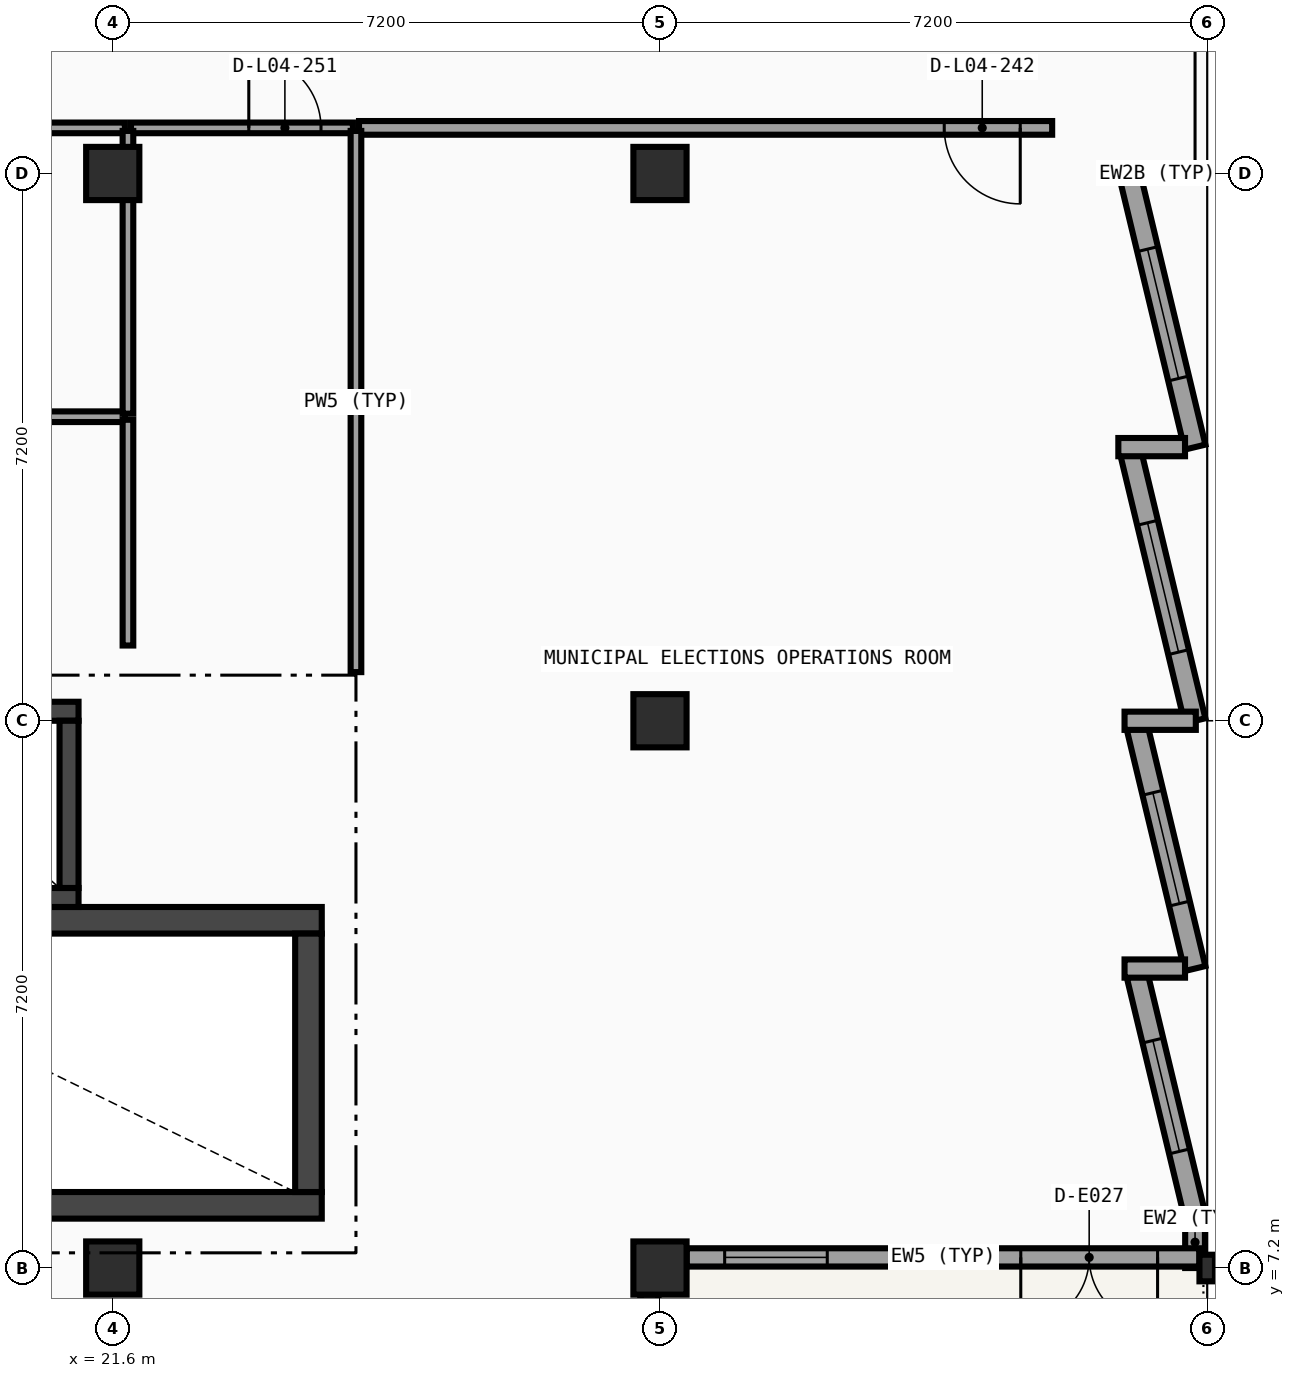
"""IFC4 building model, lengths in metres.
Left out: names, types, materials, properties, quantities, classifications, styles, units other than length and angle.
Written with IfcOpenShell. Run it as: python <this file> out.ifc"""

import sys

from ifc_helpers import new_model, si_unit, direction, frame, frame_2d, origin, origin_2d, place, context, subcontext, project, spatial, rectangle, i_section, extrude, element, fill, save


model = new_model("IFC4")
c1 = context("Model", 3, precision=1e-05, world=origin(), true_north=direction((0.0, 1.0)))
c2 = subcontext(c1, "Body", "Model", "MODEL_VIEW")
j1 = project(units=[si_unit("LENGTHUNIT", "METRE"), si_unit("PLANEANGLEUNIT", "RADIAN")], contexts=[c1])
p1 = place(None, origin())
s1 = spatial("IfcSite", under=j1, at=p1, CompositionType="ELEMENT")
p2 = place(p1, origin())
s2 = spatial("IfcBuilding", under=s1, at=p2, CompositionType="ELEMENT")
p3 = place(p2, frame((0.0, 0.0, 18.9)))
s3 = spatial("IfcBuildingStorey", under=s2, at=p3, CompositionType="ELEMENT", Elevation=18.9)
for number, where, z_axis, x_axis in (
    (1, (21.6, 7.2, 0.0), (0.0, 0.0, 1.0), (1.0, 0.0, 0.0)),
    (2, (21.6, 21.6, 0.0), (0.0, 0.0, 1.0), (1.0, 0.0, 0.0)),
    (3, (28.8, 7.2, 0.0), (0.0, 0.0, 1.0), (1.0, 0.0, 0.0)),
    (4, (28.8, 14.4, 0.0), (0.0, 0.0, 1.0), (1.0, 0.0, 0.0)),
    (5, (28.8, 21.6, 0.0), (0.0, 0.0, 1.0), (1.0, 0.0, 0.0)),
):
    element("IfcColumn", number, at=place(p3, frame(where, z_axis=z_axis, x_axis=x_axis)), inside=s3, PredefinedType="COLUMN", context=c2, shape_type="SweptSolid", body=[
        extrude(rectangle(XDim=0.7, YDim=0.7, at=origin_2d()), origin(), (0.0, 0.0, 1.0), 4.05),
    ])
p4 = place(p3, frame((36.0, 7.2, 0.0), z_axis=(0.0, 0.0, 1.0), x_axis=(1.0, 0.0, 0.0)))
e6 = element("IfcColumn", 6, at=p4, inside=s3, PredefinedType="COLUMN", context=c2, shape_type="SweptSolid", body=[
    extrude(i_section(OverallWidth=0.204, OverallDepth=0.35, WebThickness=0.009, FlangeThickness=0.015, FilletRadius=0.015, at=origin_2d()), origin(), (0.0, 0.0, 1.0), 4.05),
])
p5 = place(p3, frame((34.998, 21.508, 0.0), z_axis=(0.0, 0.0, 1.0), x_axis=(0.233495818898, -0.972357805829, 0.0)))
e7 = element("IfcWall", 7, at=p5, inside=s3, PredefinedType="SOLIDWALL", context=c2, shape_type="SweptSolid", body=[
    extrude(rectangle(XDim=3.607, YDim=0.28, at=frame_2d((1.804, 0.0))), origin(), (0.0, 0.0, 1.0), 3.8),
])
p6 = place(p5, frame((0.929, 0.0, 0.8)))
e8 = element("IfcOpeningElement", 8, at=p6, cuts=e7, PredefinedType="OPENING", context=c2, shape_type="SweptSolid", body=[
    extrude(rectangle(XDim=1.75, YDim=2.05, at=frame_2d((0.875, 1.025))), frame((0.0, 0.15, 0.0), z_axis=(0.0, -1.0, 0.0), x_axis=(1.0, 0.0, 0.0)), (0.0, 0.0, 1.0), 0.3),
])
p7 = place(p3, frame((34.831, 21.6, 0.0), z_axis=(0.0, 0.0, 1.0), x_axis=(1.0, 0.0, 0.0)))
e9 = element("IfcWall", 9, at=p7, inside=s3, PredefinedType="SOLIDWALL", context=c2, shape_type="SweptSolid", body=[
    extrude(rectangle(XDim=1.019, YDim=0.24, at=frame_2d((0.51, 0.0))), origin(), (0.0, 0.0, 1.0), 3.8),
])
p8 = place(p3, frame((34.998, 17.908, 0.0), z_axis=(0.0, 0.0, 1.0), x_axis=(0.233480453725, -0.972361495396, 0.0)))
e10 = element("IfcWall", 10, at=p8, inside=s3, PredefinedType="SOLIDWALL", context=c2, shape_type="SweptSolid", body=[
    extrude(rectangle(XDim=3.607, YDim=0.28, at=frame_2d((1.804, 0.0))), origin(), (0.0, 0.0, 1.0), 3.8),
])
p9 = place(p8, frame((0.929, 0.0, 0.8)))
e11 = element("IfcOpeningElement", 11, at=p9, cuts=e10, PredefinedType="OPENING", context=c2, shape_type="SweptSolid", body=[
    extrude(rectangle(XDim=1.75, YDim=2.05, at=frame_2d((0.875, 1.025))), frame((0.0, 0.15, 0.0), z_axis=(0.0, -1.0, 0.0), x_axis=(1.0, 0.0, 0.0)), (0.0, 0.0, 1.0), 0.3),
])
p10 = place(p3, frame((34.831, 18.0, 0.0), z_axis=(0.0, 0.0, 1.0), x_axis=(1.0, 0.0, 0.0)))
e12 = element("IfcWall", 12, at=p10, inside=s3, PredefinedType="SOLIDWALL", context=c2, shape_type="SweptSolid", body=[
    extrude(rectangle(XDim=0.877, YDim=0.24, at=frame_2d((0.438, 0.0))), origin(), (0.0, 0.0, 1.0), 3.8),
])
p11 = place(p3, frame((35.84, 7.88, 0.0), z_axis=(0.0, 0.0, 1.0), x_axis=(0.0, -1.0, 0.0)))
e13 = element("IfcWall", 13, at=p11, inside=s3, PredefinedType="SOLIDWALL", context=c2, shape_type="SweptSolid", body=[
    extrude(rectangle(XDim=0.68, YDim=0.26, at=frame_2d((0.34, 0.0))), origin(), (0.0, 0.0, 1.0), 3.216),
])
p12 = place(p3, frame((35.08, 14.308, 0.0), z_axis=(0.0, 0.0, 1.0), x_axis=(0.233443812137, -0.972370292931, 0.0)))
e14 = element("IfcWall", 14, at=p12, inside=s3, PredefinedType="SOLIDWALL", context=c2, shape_type="SweptSolid", body=[
    extrude(rectangle(XDim=3.258, YDim=0.28, at=frame_2d((1.629, 0.0))), origin(), (0.0, 0.0, 1.0), 3.8),
])
p13 = place(p12, frame((0.879, 0.0, 0.8)))
e15 = element("IfcOpeningElement", 15, at=p13, cuts=e14, PredefinedType="OPENING", context=c2, shape_type="SweptSolid", body=[
    extrude(rectangle(XDim=1.5, YDim=1.7, at=frame_2d((0.75, 0.85))), frame((0.0, 0.15, 0.0), z_axis=(0.0, -1.0, 0.0), x_axis=(1.0, 0.0, 0.0)), (0.0, 0.0, 1.0), 0.3),
])
p14 = place(p3, frame((34.912, 14.4, 0.0), z_axis=(0.0, 0.0, 1.0), x_axis=(1.0, 0.0, 0.0)))
e16 = element("IfcWall", 16, at=p14, inside=s3, PredefinedType="SOLIDWALL", context=c2, shape_type="SweptSolid", body=[
    extrude(rectangle(XDim=0.938, YDim=0.24, at=frame_2d((0.469, 0.0))), origin(), (0.0, 0.0, 1.0), 3.8),
])
p15 = place(p3, frame((35.08, 11.048, 0.0), z_axis=(0.0, 0.0, 1.0), x_axis=(0.233443812137, -0.972370292931, 0.0)))
e17 = element("IfcWall", 17, at=p15, inside=s3, PredefinedType="SOLIDWALL", context=c2, shape_type="SweptSolid", body=[
    extrude(rectangle(XDim=3.258, YDim=0.28, at=frame_2d((1.629, 0.0))), origin(), (0.0, 0.0, 1.0), 3.8),
])
p16 = place(p15, frame((0.879, 0.0, 0.8)))
e18 = element("IfcOpeningElement", 18, at=p16, cuts=e17, PredefinedType="OPENING", context=c2, shape_type="SweptSolid", body=[
    extrude(rectangle(XDim=1.5, YDim=1.7, at=frame_2d((0.75, 0.85))), frame((0.0, 0.15, 0.0), z_axis=(0.0, -1.0, 0.0), x_axis=(1.0, 0.0, 0.0)), (0.0, 0.0, 1.0), 0.3),
])
p17 = place(p3, frame((34.912, 11.14, 0.0), z_axis=(0.0, 0.0, 1.0), x_axis=(1.0, 0.0, 0.0)))
e19 = element("IfcWall", 19, at=p17, inside=s3, PredefinedType="SOLIDWALL", context=c2, shape_type="SweptSolid", body=[
    extrude(rectangle(XDim=0.796, YDim=0.24, at=frame_2d((0.398, 0.0))), origin(), (0.0, 0.0, 1.0), 3.8),
])
p18 = place(p3, frame((35.897, 7.34, 0.0), z_axis=(0.0, 0.0, 1.0), x_axis=(-1.0, 0.0, 0.0)))
e20 = element("IfcWall", 20, at=p18, inside=s3, PredefinedType="SOLIDWALL", context=c2, shape_type="SweptSolid", body=[
    extrude(rectangle(XDim=6.746, YDim=0.24, at=frame_2d((3.373, 0.0))), origin(), (0.0, 0.0, 1.0), 3.216),
])
p19 = place(p18, frame((0.55, 0.0, 0.0)))
e21 = element("IfcOpeningElement", 21, at=p19, cuts=e20, PredefinedType="OPENING", context=c2, shape_type="SweptSolid", body=[
    extrude(rectangle(XDim=1.8, YDim=2.15, at=frame_2d((0.9, 1.075))), frame((0.0, 0.13, 0.0), z_axis=(0.0, -1.0, 0.0), x_axis=(1.0, 0.0, 0.0)), (0.0, 0.0, 1.0), 0.26),
])
p20 = place(p18, frame((4.896, 0.0, 0.85)))
e22 = element("IfcOpeningElement", 22, at=p20, cuts=e20, PredefinedType="OPENING", context=c2, shape_type="SweptSolid", body=[
    extrude(rectangle(XDim=1.35, YDim=1.85, at=frame_2d((0.675, 0.925))), frame((0.0, 0.13, 0.0), z_axis=(0.0, -1.0, 0.0), x_axis=(1.0, 0.0, 0.0)), (0.0, 0.0, 1.0), 0.26),
])
p21 = place(p3, frame((28.66, 6.849, 0.0), z_axis=(0.0, 0.0, 1.0), x_axis=(0.0, -1.0, 0.0)))
e23 = element("IfcWall", 23, at=p21, inside=s3, PredefinedType="SOLIDWALL", context=c2, shape_type="SweptSolid", body=[
    extrude(rectangle(XDim=6.498, YDim=0.24, at=frame_2d((3.249, 0.0))), origin(), (0.0, 0.0, 1.0), 3.216),
])
p22 = place(p21, frame((0.55, 0.0, 0.0)))
e24 = element("IfcOpeningElement", 24, at=p22, cuts=e23, PredefinedType="OPENING", context=c2, shape_type="SweptSolid", body=[
    extrude(rectangle(XDim=1.8, YDim=2.15, at=frame_2d((0.9, 1.075))), frame((0.0, 0.13, 0.0), z_axis=(0.0, -1.0, 0.0), x_axis=(1.0, 0.0, 0.0)), (0.0, 0.0, 1.0), 0.26),
])
p23 = place(p21, frame((4.648, 0.0, 0.85)))
e25 = element("IfcOpeningElement", 25, at=p23, cuts=e23, PredefinedType="OPENING", context=c2, shape_type="SweptSolid", body=[
    extrude(rectangle(XDim=1.35, YDim=1.85, at=frame_2d((0.675, 0.925))), frame((0.0, 0.13, 0.0), z_axis=(0.0, -1.0, 0.0), x_axis=(1.0, 0.0, 0.0)), (0.0, 0.0, 1.0), 0.26),
])
for number, where, z_axis, x_axis in (
    (26, (15.05, 8.025, 0.0), (0.0, 0.0, 1.0), (1.0, 0.0, 0.0)),
    (27, (24.35, 11.775, 0.0), (0.0, 0.0, 1.0), (-1.0, 0.0, 0.0)),
):
    element("IfcWall", number, at=place(p3, frame(where, z_axis=z_axis, x_axis=x_axis)), inside=s3, PredefinedType="SHEAR", context=c2, shape_type="SweptSolid", body=[
        extrude(rectangle(XDim=9.3, YDim=0.35, at=frame_2d((4.65, 0.0))), origin(), (0.0, 0.0, 1.0), 3.8),
    ])
p24 = place(p3, frame((24.175, 8.2, 0.0), z_axis=(0.0, 0.0, 1.0), x_axis=(0.0, 1.0, 0.0)))
e28 = element("IfcWall", 28, at=p24, inside=s3, PredefinedType="SHEAR", context=c2, shape_type="SweptSolid", body=[
    extrude(rectangle(XDim=3.4, YDim=0.35, at=frame_2d((1.7, 0.0))), origin(), (0.0, 0.0, 1.0), 3.8),
])
for number, where, z_axis, x_axis in (
    (29, (18.15, 12.075, 0.0), (0.0, 0.0, 1.0), (1.0, 0.0, 0.0)),
    (30, (21.15, 14.525, 0.0), (0.0, 0.0, 1.0), (-1.0, 0.0, 0.0)),
):
    element("IfcWall", number, at=place(p3, frame(where, z_axis=z_axis, x_axis=x_axis)), inside=s3, PredefinedType="SHEAR", context=c2, shape_type="SweptSolid", body=[
        extrude(rectangle(XDim=3.0, YDim=0.25, at=frame_2d((1.5, 0.0))), origin(), (0.0, 0.0, 1.0), 3.8),
    ])
p25 = place(p3, frame((21.025, 12.2, 0.0), z_axis=(0.0, 0.0, 1.0), x_axis=(0.0, 1.0, 0.0)))
e31 = element("IfcWall", 31, at=p25, inside=s3, PredefinedType="SHEAR", context=c2, shape_type="SweptSolid", body=[
    extrude(rectangle(XDim=2.2, YDim=0.25, at=frame_2d((1.1, 0.0))), origin(), (0.0, 0.0, 1.0), 3.8),
])
p26 = place(p3, frame((24.84, 22.2, 0.0), z_axis=(0.0, 0.0, 1.0), x_axis=(1.0, 0.0, 0.0)))
e32 = element("IfcWall", 32, at=p26, inside=s3, PredefinedType="PARTITIONING", context=c2, shape_type="SweptSolid", body=[
    extrude(rectangle(XDim=9.12, YDim=0.18, at=frame_2d((4.56, 0.0))), origin(), (0.0, 0.0, 1.0), 3.206),
])
p27 = place(p26, frame((7.7, 0.0, 0.0)))
e33 = element("IfcOpeningElement", 33, at=p27, cuts=e32, PredefinedType="OPENING", context=c2, shape_type="SweptSolid", body=[
    extrude(rectangle(XDim=1.0, YDim=2.1, at=frame_2d((0.5, 1.05))), frame((0.0, 0.1, 0.0), z_axis=(0.0, -1.0, 0.0), x_axis=(1.0, 0.0, 0.0)), (0.0, 0.0, 1.0), 0.2),
])
p28 = place(p3, frame((17.64, 22.2, 0.0), z_axis=(0.0, 0.0, 1.0), x_axis=(1.0, 0.0, 0.0)))
e34 = element("IfcWall", 34, at=p28, inside=s3, PredefinedType="PARTITIONING", context=c2, shape_type="SweptSolid", body=[
    extrude(rectangle(XDim=4.12, YDim=0.14, at=frame_2d((2.06, 0.0))), origin(), (0.0, 0.0, 1.0), 3.206),
])
p29 = place(p28, frame((0.42, 0.0, 0.0)))
e35 = element("IfcOpeningElement", 35, at=p29, cuts=e34, PredefinedType="OPENING", context=c2, shape_type="SweptSolid", body=[
    extrude(rectangle(XDim=0.95, YDim=2.08, at=frame_2d((0.475, 1.04))), frame((0.0, 0.08, 0.0), z_axis=(0.0, -1.0, 0.0), x_axis=(1.0, 0.0, 0.0)), (0.0, 0.0, 1.0), 0.16),
])
p30 = place(p3, frame((21.84, 22.2, 0.0), z_axis=(0.0, 0.0, 1.0), x_axis=(1.0, 0.0, 0.0)))
e36 = element("IfcWall", 36, at=p30, inside=s3, PredefinedType="PARTITIONING", context=c2, shape_type="SweptSolid", body=[
    extrude(rectangle(XDim=2.92, YDim=0.14, at=frame_2d((1.46, 0.0))), origin(), (0.0, 0.0, 1.0), 3.8),
])
p31 = place(p30, frame((1.55, 0.0, 0.0)))
e37 = element("IfcOpeningElement", 37, at=p31, cuts=e36, PredefinedType="OPENING", context=c2, shape_type="SweptSolid", body=[
    extrude(rectangle(XDim=0.95, YDim=2.08, at=frame_2d((0.475, 1.04))), frame((0.0, 0.08, 0.0), z_axis=(0.0, -1.0, 0.0), x_axis=(1.0, 0.0, 0.0)), (0.0, 0.0, 1.0), 0.16),
])
p32 = place(p3, frame((24.8, 15.04, 0.0), z_axis=(0.0, 0.0, 1.0), x_axis=(0.0, 1.0, 0.0)))
e38 = element("IfcWall", 38, at=p32, inside=s3, PredefinedType="PARTITIONING", context=c2, shape_type="SweptSolid", body=[
    extrude(rectangle(XDim=7.12, YDim=0.14, at=frame_2d((3.56, 0.0))), origin(), (0.0, 0.0, 1.0), 3.208),
])
p33 = place(p3, frame((17.64, 18.4, 0.0), z_axis=(0.0, 0.0, 1.0), x_axis=(1.0, 0.0, 0.0)))
e39 = element("IfcWall", 39, at=p33, inside=s3, PredefinedType="PARTITIONING", context=c2, shape_type="SweptSolid", body=[
    extrude(rectangle(XDim=4.12, YDim=0.14, at=frame_2d((2.06, 0.0))), origin(), (0.0, 0.0, 1.0), 3.8),
])
p34 = place(p33, frame((0.42, 0.0, 0.0)))
e40 = element("IfcOpeningElement", 40, at=p34, cuts=e39, PredefinedType="OPENING", context=c2, shape_type="SweptSolid", body=[
    extrude(rectangle(XDim=0.95, YDim=2.08, at=frame_2d((0.475, 1.04))), frame((0.0, 0.08, 0.0), z_axis=(0.0, -1.0, 0.0), x_axis=(1.0, 0.0, 0.0)), (0.0, 0.0, 1.0), 0.16),
])
p35 = place(p3, frame((21.8, 15.39, 0.0), z_axis=(0.0, 0.0, 1.0), x_axis=(0.0, 1.0, 0.0)))
e41 = element("IfcWall", 41, at=p35, inside=s3, PredefinedType="PARTITIONING", context=c2, shape_type="SweptSolid", body=[
    extrude(rectangle(XDim=2.97, YDim=0.14, at=frame_2d((1.485, 0.0))), origin(), (0.0, 0.0, 1.0), 3.8),
])
p36 = place(p3, frame((21.8, 18.44, 0.0), z_axis=(0.0, 0.0, 1.0), x_axis=(0.0, 1.0, 0.0)))
e42 = element("IfcWall", 42, at=p36, inside=s3, PredefinedType="PARTITIONING", context=c2, shape_type="SweptSolid", body=[
    extrude(rectangle(XDim=3.72, YDim=0.14, at=frame_2d((1.86, 0.0))), origin(), (0.0, 0.0, 1.0), 3.206),
])
p37 = place(p6, origin())
e43 = element("IfcWindow", 43, at=p37, inside=s3, PartitioningType="SINGLE_PANEL", PredefinedType="WINDOW", context=c2, shape_type="SweptSolid", body=[
    extrude(rectangle(XDim=1.75, YDim=2.05, at=frame_2d((0.875, 1.025))), frame((0.0, 0.03, 0.0), z_axis=(0.0, -1.0, 0.0), x_axis=(1.0, 0.0, 0.0)), (0.0, 0.0, 1.0), 0.06),
])
fill(e8, e43)
p38 = place(p9, origin())
e44 = element("IfcWindow", 44, at=p38, inside=s3, PartitioningType="SINGLE_PANEL", PredefinedType="WINDOW", context=c2, shape_type="SweptSolid", body=[
    extrude(rectangle(XDim=1.75, YDim=2.05, at=frame_2d((0.875, 1.025))), frame((0.0, 0.03, 0.0), z_axis=(0.0, -1.0, 0.0), x_axis=(1.0, 0.0, 0.0)), (0.0, 0.0, 1.0), 0.06),
])
fill(e11, e44)
p39 = place(p13, origin())
e45 = element("IfcWindow", 45, at=p39, inside=s3, PartitioningType="SINGLE_PANEL", PredefinedType="WINDOW", context=c2, shape_type="SweptSolid", body=[
    extrude(rectangle(XDim=1.5, YDim=1.7, at=frame_2d((0.75, 0.85))), frame((0.0, 0.03, 0.0), z_axis=(0.0, -1.0, 0.0), x_axis=(1.0, 0.0, 0.0)), (0.0, 0.0, 1.0), 0.06),
])
fill(e15, e45)
p40 = place(p16, origin())
e46 = element("IfcWindow", 46, at=p40, inside=s3, PartitioningType="SINGLE_PANEL", PredefinedType="WINDOW", context=c2, shape_type="SweptSolid", body=[
    extrude(rectangle(XDim=1.5, YDim=1.7, at=frame_2d((0.75, 0.85))), frame((0.0, 0.03, 0.0), z_axis=(0.0, -1.0, 0.0), x_axis=(1.0, 0.0, 0.0)), (0.0, 0.0, 1.0), 0.06),
])
fill(e18, e46)
p41 = place(p19, origin())
e47 = element("IfcDoor", 47, at=p41, inside=s3, OperationType="DOUBLE_DOOR_SINGLE_SWING", PredefinedType="DOOR", context=c2, shape_type="SweptSolid", body=[
    extrude(rectangle(XDim=1.8, YDim=2.15, at=frame_2d((0.9, 1.075))), frame((0.0, 0.025, 0.0), z_axis=(0.0, -1.0, 0.0), x_axis=(1.0, 0.0, 0.0)), (0.0, 0.0, 1.0), 0.05),
])
fill(e21, e47)
p42 = place(p20, origin())
e48 = element("IfcWindow", 48, at=p42, inside=s3, PartitioningType="SINGLE_PANEL", PredefinedType="WINDOW", context=c2, shape_type="SweptSolid", body=[
    extrude(rectangle(XDim=1.35, YDim=1.85, at=frame_2d((0.675, 0.925))), frame((0.0, 0.03, 0.0), z_axis=(0.0, -1.0, 0.0), x_axis=(1.0, 0.0, 0.0)), (0.0, 0.0, 1.0), 0.06),
])
fill(e22, e48)
p43 = place(p27, origin())
e49 = element("IfcDoor", 49, at=p43, inside=s3, OperationType="SINGLE_SWING_RIGHT", PredefinedType="DOOR", context=c2, shape_type="SweptSolid", body=[
    extrude(rectangle(XDim=1.0, YDim=2.1, at=frame_2d((0.5, 1.05))), frame((0.0, 0.025, 0.0), z_axis=(0.0, -1.0, 0.0), x_axis=(1.0, 0.0, 0.0)), (0.0, 0.0, 1.0), 0.05),
])
fill(e33, e49)
p44 = place(p31, origin())
e50 = element("IfcDoor", 50, at=p44, inside=s3, OperationType="SINGLE_SWING_LEFT", PredefinedType="DOOR", context=c2, shape_type="SweptSolid", body=[
    extrude(rectangle(XDim=0.95, YDim=2.08, at=frame_2d((0.475, 1.04))), frame((0.0, 0.025, 0.0), z_axis=(0.0, -1.0, 0.0), x_axis=(1.0, 0.0, 0.0)), (0.0, 0.0, 1.0), 0.05),
])
fill(e37, e50)
save(model, sys.argv[1])
